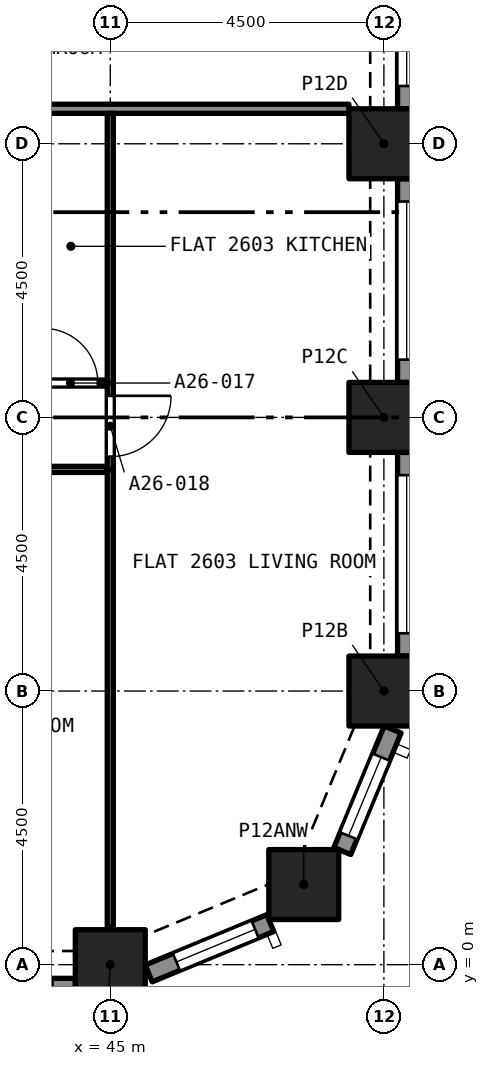
"""IFC4 building model, lengths in metres.
Left out: names, types, materials, properties, quantities, classifications, styles, units other than length and angle.
Written with IfcOpenShell. Run it as: python <this file> out.ifc"""

import sys

from ifc_helpers import new_model, si_unit, direction, frame, frame_2d, origin, origin_2d, place, context, subcontext, project, spatial, rectangle, extrude, element, fill, save


model = new_model("IFC4")
c1 = context("Model", 3, precision=1e-05, world=origin(), true_north=direction((0.0, 1.0)))
c2 = subcontext(c1, "Body", "Model", "MODEL_VIEW")
j1 = project(units=[si_unit("LENGTHUNIT", "METRE"), si_unit("PLANEANGLEUNIT", "RADIAN")], contexts=[c1])
p1 = place(None, origin())
s1 = spatial("IfcSite", under=j1, at=p1, CompositionType="ELEMENT")
p2 = place(p1, origin())
s2 = spatial("IfcBuilding", under=s1, at=p2, CompositionType="ELEMENT")
p3 = place(p2, frame((0.0, 0.0, 96.0)))
s3 = spatial("IfcBuildingStorey", under=s2, at=p3, CompositionType="ELEMENT", Elevation=96.0)
for number, where, z_axis, x_axis in (
    (1, (45.0, 0.0, 0.0), (0.0, 0.0, 1.0), (1.0, 0.0, 0.0)),
    (2, (48.182, 1.318, 0.0), (0.0, 0.0, 1.0), (1.0, 0.0, 0.0)),
    (3, (49.5, 4.5, 0.0), (0.0, 0.0, 1.0), (1.0, 0.0, 0.0)),
    (4, (49.5, 9.0, 0.0), (0.0, 0.0, 1.0), (1.0, 0.0, 0.0)),
    (5, (49.5, 13.5, 0.0), (0.0, 0.0, 1.0), (1.0, 0.0, 0.0)),
):
    element("IfcColumn", number, at=place(p3, frame(where, z_axis=z_axis, x_axis=x_axis)), inside=s3, PredefinedType="COLUMN", context=c2, shape_type="SweptSolid", body=[
        extrude(rectangle(XDim=1.15, YDim=1.15, at=origin_2d()), origin(), (0.0, 0.0, 1.0), 3.2),
    ])
p4 = place(p3, frame((44.425, -0.375, 0.0), z_axis=(0.0, 0.0, 1.0), x_axis=(-1.0, 0.0, 0.0)))
e6 = element("IfcWall", 6, at=p4, inside=s3, PredefinedType="SOLIDWALL", context=c2, shape_type="SweptSolid", body=[
    extrude(rectangle(XDim=3.35, YDim=0.3, at=frame_2d((1.675, 0.0))), origin(), (0.0, 0.0, 1.0), 3.2),
])
p5 = place(p4, frame((0.375, 0.0, 0.45)))
e7 = element("IfcOpeningElement", 7, at=p5, cuts=e6, PredefinedType="OPENING", context=c2, shape_type="SweptSolid", body=[
    extrude(rectangle(XDim=2.6, YDim=1.95, at=frame_2d((1.3, 0.975))), frame((0.0, 0.16, 0.0), z_axis=(0.0, -1.0, 0.0), x_axis=(1.0, 0.0, 0.0)), (0.0, 0.0, 1.0), 0.32),
])
p6 = place(p3, frame((47.631, 0.684, 0.0), z_axis=(0.0, 0.0, 1.0), x_axis=(-0.923862802911, -0.382723818695, 0.0)))
e8 = element("IfcWall", 8, at=p6, inside=s3, PredefinedType="SOLIDWALL", context=c2, shape_type="SweptSolid", body=[
    extrude(rectangle(XDim=2.164, YDim=0.3, at=frame_2d((1.082, 0.0))), origin(), (0.0, 0.0, 1.0), 3.2),
])
p7 = place(p6, frame((0.271, 0.0, 0.45)))
e9 = element("IfcOpeningElement", 9, at=p7, cuts=e8, PredefinedType="OPENING", context=c2, shape_type="SweptSolid", body=[
    extrude(rectangle(XDim=1.4, YDim=1.95, at=frame_2d((0.7, 0.975))), frame((0.0, 0.16, 0.0), z_axis=(0.0, -1.0, 0.0), x_axis=(1.0, 0.0, 0.0)), (0.0, 0.0, 1.0), 0.32),
])
p8 = place(p3, frame((49.644, 3.868, 0.0), z_axis=(0.0, 0.0, 1.0), x_axis=(-0.382723818695, -0.923862802911, 0.0)))
e10 = element("IfcWall", 10, at=p8, inside=s3, PredefinedType="SOLIDWALL", context=c2, shape_type="SweptSolid", body=[
    extrude(rectangle(XDim=2.164, YDim=0.3, at=frame_2d((1.082, 0.0))), origin(), (0.0, 0.0, 1.0), 3.2),
])
p9 = place(p8, frame((0.493, 0.0, 0.45)))
e11 = element("IfcOpeningElement", 11, at=p9, cuts=e10, PredefinedType="OPENING", context=c2, shape_type="SweptSolid", body=[
    extrude(rectangle(XDim=1.4, YDim=1.95, at=frame_2d((0.7, 0.975))), frame((0.0, 0.16, 0.0), z_axis=(0.0, -1.0, 0.0), x_axis=(1.0, 0.0, 0.0)), (0.0, 0.0, 1.0), 0.32),
])
p10 = place(p3, frame((49.875, 8.425, 0.0), z_axis=(0.0, 0.0, 1.0), x_axis=(0.0, -1.0, 0.0)))
e12 = element("IfcWall", 12, at=p10, inside=s3, PredefinedType="SOLIDWALL", context=c2, shape_type="SweptSolid", body=[
    extrude(rectangle(XDim=3.35, YDim=0.3, at=frame_2d((1.675, 0.0))), origin(), (0.0, 0.0, 1.0), 3.2),
])
p11 = place(p10, frame((0.375, 0.0, 0.45)))
e13 = element("IfcOpeningElement", 13, at=p11, cuts=e12, PredefinedType="OPENING", context=c2, shape_type="SweptSolid", body=[
    extrude(rectangle(XDim=2.6, YDim=1.95, at=frame_2d((1.3, 0.975))), frame((0.0, 0.16, 0.0), z_axis=(0.0, -1.0, 0.0), x_axis=(1.0, 0.0, 0.0)), (0.0, 0.0, 1.0), 0.32),
])
p12 = place(p3, frame((49.875, 12.925, 0.0), z_axis=(0.0, 0.0, 1.0), x_axis=(0.0, -1.0, 0.0)))
e14 = element("IfcWall", 14, at=p12, inside=s3, PredefinedType="SOLIDWALL", context=c2, shape_type="SweptSolid", body=[
    extrude(rectangle(XDim=3.35, YDim=0.3, at=frame_2d((1.675, 0.0))), origin(), (0.0, 0.0, 1.0), 3.2),
])
p13 = place(p12, frame((0.375, 0.0, 0.45)))
e15 = element("IfcOpeningElement", 15, at=p13, cuts=e14, PredefinedType="OPENING", context=c2, shape_type="SweptSolid", body=[
    extrude(rectangle(XDim=2.6, YDim=1.95, at=frame_2d((1.3, 0.975))), frame((0.0, 0.16, 0.0), z_axis=(0.0, -1.0, 0.0), x_axis=(1.0, 0.0, 0.0)), (0.0, 0.0, 1.0), 0.32),
])
p14 = place(p3, frame((49.875, 17.425, 0.0), z_axis=(0.0, 0.0, 1.0), x_axis=(0.0, -1.0, 0.0)))
e16 = element("IfcWall", 16, at=p14, inside=s3, PredefinedType="SOLIDWALL", context=c2, shape_type="SweptSolid", body=[
    extrude(rectangle(XDim=3.35, YDim=0.3, at=frame_2d((1.675, 0.0))), origin(), (0.0, 0.0, 1.0), 3.2),
])
p15 = place(p14, frame((0.375, 0.0, 0.45)))
e17 = element("IfcOpeningElement", 17, at=p15, cuts=e16, PredefinedType="OPENING", context=c2, shape_type="SweptSolid", body=[
    extrude(rectangle(XDim=2.6, YDim=1.95, at=frame_2d((1.3, 0.975))), frame((0.0, 0.16, 0.0), z_axis=(0.0, -1.0, 0.0), x_axis=(1.0, 0.0, 0.0)), (0.0, 0.0, 1.0), 0.32),
])
p16 = place(p3, frame((42.6, 14.075, 0.0), z_axis=(0.0, 0.0, 1.0), x_axis=(1.0, 0.0, 0.0)))
e18 = element("IfcWall", 18, at=p16, inside=s3, PredefinedType="PARTITIONING", context=c2, shape_type="SweptSolid", body=[
    extrude(rectangle(XDim=6.325, YDim=0.15, at=frame_2d((3.163, 0.0))), origin(), (0.0, 0.0, 1.0), 2.9),
])
p17 = place(p3, frame((44.95, 8.145, 0.0), z_axis=(0.0, 0.0, 1.0), x_axis=(-1.0, 0.0, 0.0)))
e19 = element("IfcWall", 19, at=p17, inside=s3, PredefinedType="PARTITIONING", context=c2, shape_type="SweptSolid", body=[
    extrude(rectangle(XDim=4.35, YDim=0.1, at=frame_2d((2.175, 0.0))), origin(), (0.0, 0.0, 1.0), 2.9),
])
p18 = place(p17, frame((1.75, 0.0, 0.0)))
e20 = element("IfcOpeningElement", 20, at=p18, cuts=e19, PredefinedType="OPENING", context=c2, shape_type="SweptSolid", body=[
    extrude(rectangle(XDim=0.9, YDim=2.1, at=frame_2d((0.45, 1.05))), frame((0.0, 0.06, 0.0), z_axis=(0.0, -1.0, 0.0), x_axis=(1.0, 0.0, 0.0)), (0.0, 0.0, 1.0), 0.12),
])
p19 = place(p3, frame((45.0, 0.622, 0.0), z_axis=(0.0, 0.0, 1.0), x_axis=(0.0, 1.0, 0.0)))
e21 = element("IfcWall", 21, at=p19, inside=s3, PredefinedType="PARTITIONING", context=c2, shape_type="SweptSolid", body=[
    extrude(rectangle(XDim=7.523, YDim=0.1, at=frame_2d((3.761, 0.0))), origin(), (0.0, 0.0, 1.0), 2.9),
])
p20 = place(p3, frame((43.691, 9.565, 0.0), z_axis=(0.0, 0.0, 1.0), x_axis=(1.0, 0.0, 0.0)))
e22 = element("IfcWall", 22, at=p20, inside=s3, PredefinedType="PARTITIONING", context=c2, shape_type="SweptSolid", body=[
    extrude(rectangle(XDim=1.259, YDim=0.1, at=frame_2d((0.629, 0.0))), origin(), (0.0, 0.0, 1.0), 2.9),
])
p21 = place(p20, frame((0.205, 0.0, 0.0)))
e23 = element("IfcOpeningElement", 23, at=p21, cuts=e22, PredefinedType="OPENING", context=c2, shape_type="SweptSolid", body=[
    extrude(rectangle(XDim=0.9, YDim=2.1, at=frame_2d((0.45, 1.05))), frame((0.0, 0.06, 0.0), z_axis=(0.0, -1.0, 0.0), x_axis=(1.0, 0.0, 0.0)), (0.0, 0.0, 1.0), 0.12),
])
p22 = place(p3, frame((45.0, 9.565, 0.0), z_axis=(0.0, 0.0, 1.0), x_axis=(0.0, -1.0, 0.0)))
e24 = element("IfcWall", 24, at=p22, inside=s3, PredefinedType="PARTITIONING", context=c2, shape_type="SweptSolid", body=[
    extrude(rectangle(XDim=1.42, YDim=0.1, at=frame_2d((0.71, 0.0))), origin(), (0.0, 0.0, 1.0), 2.9),
])
p23 = place(p22, frame((0.21, 0.0, 0.0)))
e25 = element("IfcOpeningElement", 25, at=p23, cuts=e24, PredefinedType="OPENING", context=c2, shape_type="SweptSolid", body=[
    extrude(rectangle(XDim=1.0, YDim=2.1, at=frame_2d((0.5, 1.05))), frame((0.0, 0.06, 0.0), z_axis=(0.0, -1.0, 0.0), x_axis=(1.0, 0.0, 0.0)), (0.0, 0.0, 1.0), 0.12),
])
p24 = place(p3, frame((45.0, 9.565, 0.0), z_axis=(0.0, 0.0, 1.0), x_axis=(0.0, 1.0, 0.0)))
e26 = element("IfcWall", 26, at=p24, inside=s3, PredefinedType="PARTITIONING", context=c2, shape_type="SweptSolid", body=[
    extrude(rectangle(XDim=4.435, YDim=0.1, at=frame_2d((2.218, 0.0))), origin(), (0.0, 0.0, 1.0), 2.9),
])
p25 = place(p7, origin())
e27 = element("IfcWindow", 27, at=p25, inside=s3, PartitioningType="SINGLE_PANEL", PredefinedType="WINDOW", context=c2, shape_type="SweptSolid", body=[
    extrude(rectangle(XDim=1.4, YDim=1.95, at=frame_2d((0.7, 0.975))), frame((0.0, 0.03, 0.0), z_axis=(0.0, -1.0, 0.0), x_axis=(1.0, 0.0, 0.0)), (0.0, 0.0, 1.0), 0.06),
])
fill(e9, e27)
p26 = place(p9, origin())
e28 = element("IfcWindow", 28, at=p26, inside=s3, PartitioningType="SINGLE_PANEL", PredefinedType="WINDOW", context=c2, shape_type="SweptSolid", body=[
    extrude(rectangle(XDim=1.4, YDim=1.95, at=frame_2d((0.7, 0.975))), frame((0.0, 0.03, 0.0), z_axis=(0.0, -1.0, 0.0), x_axis=(1.0, 0.0, 0.0)), (0.0, 0.0, 1.0), 0.06),
])
fill(e11, e28)
p27 = place(p11, origin())
e29 = element("IfcWindow", 29, at=p27, inside=s3, PartitioningType="SINGLE_PANEL", PredefinedType="WINDOW", context=c2, shape_type="SweptSolid", body=[
    extrude(rectangle(XDim=2.6, YDim=1.95, at=frame_2d((1.3, 0.975))), frame((0.0, 0.03, 0.0), z_axis=(0.0, -1.0, 0.0), x_axis=(1.0, 0.0, 0.0)), (0.0, 0.0, 1.0), 0.06),
])
fill(e13, e29)
p28 = place(p13, origin())
e30 = element("IfcWindow", 30, at=p28, inside=s3, PartitioningType="SINGLE_PANEL", PredefinedType="WINDOW", context=c2, shape_type="SweptSolid", body=[
    extrude(rectangle(XDim=2.6, YDim=1.95, at=frame_2d((1.3, 0.975))), frame((0.0, 0.03, 0.0), z_axis=(0.0, -1.0, 0.0), x_axis=(1.0, 0.0, 0.0)), (0.0, 0.0, 1.0), 0.06),
])
fill(e15, e30)
p29 = place(p15, origin())
e31 = element("IfcWindow", 31, at=p29, inside=s3, PartitioningType="SINGLE_PANEL", PredefinedType="WINDOW", context=c2, shape_type="SweptSolid", body=[
    extrude(rectangle(XDim=2.6, YDim=1.95, at=frame_2d((1.3, 0.975))), frame((0.0, 0.03, 0.0), z_axis=(0.0, -1.0, 0.0), x_axis=(1.0, 0.0, 0.0)), (0.0, 0.0, 1.0), 0.06),
])
fill(e17, e31)
p30 = place(p21, origin())
e32 = element("IfcDoor", 32, at=p30, inside=s3, OperationType="SINGLE_SWING_RIGHT", PredefinedType="DOOR", context=c2, shape_type="SweptSolid", body=[
    extrude(rectangle(XDim=0.9, YDim=2.1, at=frame_2d((0.45, 1.05))), frame((0.0, 0.025, 0.0), z_axis=(0.0, -1.0, 0.0), x_axis=(1.0, 0.0, 0.0)), (0.0, 0.0, 1.0), 0.05),
])
fill(e23, e32)
p31 = place(p23, origin())
e33 = element("IfcDoor", 33, at=p31, inside=s3, OperationType="SINGLE_SWING_LEFT", PredefinedType="DOOR", context=c2, shape_type="SweptSolid", body=[
    extrude(rectangle(XDim=1.0, YDim=2.1, at=frame_2d((0.5, 1.05))), frame((0.0, 0.025, 0.0), z_axis=(0.0, -1.0, 0.0), x_axis=(1.0, 0.0, 0.0)), (0.0, 0.0, 1.0), 0.05),
])
fill(e25, e33)
save(model, sys.argv[1])
